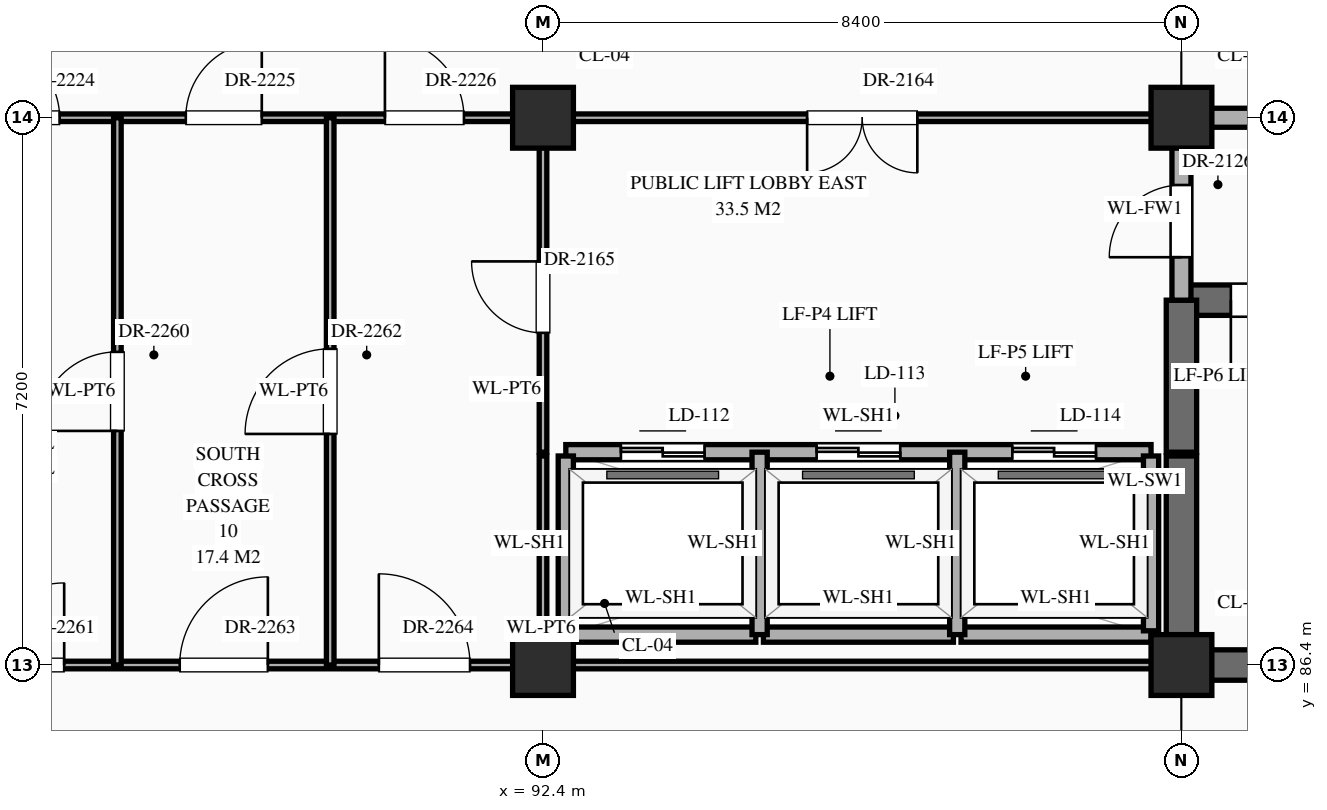
"""IFC4 building model, lengths in metres.
Left out: names, types, materials, properties, quantities, classifications, styles, units other than length and angle.
Written with IfcOpenShell. Run it as: python <this file> out.ifc"""

import sys

from ifc_helpers import new_model, si_unit, direction, frame, frame_2d, origin, origin_2d, place, context, subcontext, project, spatial, rectangle, extrude, element, fill, save


model = new_model("IFC4")
c1 = context("Model", 3, precision=1e-05, world=origin(), true_north=direction((0.0, 1.0)))
c2 = subcontext(c1, "Body", "Model", "MODEL_VIEW")
j1 = project(units=[si_unit("LENGTHUNIT", "METRE"), si_unit("PLANEANGLEUNIT", "RADIAN")], contexts=[c1])
p1 = place(None, origin())
s1 = spatial("IfcSite", under=j1, at=p1, CompositionType="ELEMENT")
p2 = place(p1, origin())
s2 = spatial("IfcBuilding", under=s1, at=p2, CompositionType="ELEMENT")
p3 = place(p2, frame((0.0, 0.0, 26.1)))
s3 = spatial("IfcBuildingStorey", under=s2, at=p3, CompositionType="ELEMENT", Elevation=26.1)
for number, where, z_axis, x_axis in (
    (1, (92.4, 86.4, 0.0), (0.0, 0.0, 1.0), (1.0, 0.0, 0.0)),
    (2, (92.4, 93.6, 0.0), (0.0, 0.0, 1.0), (1.0, 0.0, 0.0)),
    (3, (100.8, 86.4, 0.0), (0.0, 0.0, 1.0), (1.0, 0.0, 0.0)),
    (4, (100.8, 93.6, 0.0), (0.0, 0.0, 1.0), (1.0, 0.0, 0.0)),
):
    element("IfcColumn", number, at=place(p3, frame(where, z_axis=z_axis, x_axis=x_axis)), inside=s3, PredefinedType="COLUMN", context=c2, shape_type="SweptSolid", body=[
        extrude(rectangle(XDim=0.8, YDim=0.8, at=origin_2d()), origin(), (0.0, 0.0, 1.0), 4.5),
    ])
p4 = place(p3, frame((84.0, 86.4, 0.0), z_axis=(0.0, 0.0, 1.0), x_axis=(1.0, 0.0, 0.0)))
e5 = element("IfcWall", 5, at=p4, inside=s3, PredefinedType="STANDARD", context=c2, shape_type="SweptSolid", body=[
    extrude(rectangle(XDim=8.4, YDim=0.1, at=frame_2d((4.2, 0.0))), origin(), (0.0, 0.0, 1.0), 3.39),
])
p5 = place(p4, frame((1.02, 0.0, 0.0)))
e6 = element("IfcOpeningElement", 6, at=p5, cuts=e5, PredefinedType="OPENING", context=c2, shape_type="SweptSolid", body=[
    extrude(rectangle(XDim=1.08, YDim=2.25, at=frame_2d((0.54, 1.125))), frame((0.0, 0.062, 0.0), z_axis=(0.0, -1.0, 0.0), x_axis=(1.0, 0.0, 0.0)), (0.0, 0.0, 1.0), 0.124),
])
p6 = place(p4, frame((3.62, 0.0, 0.0)))
e7 = element("IfcOpeningElement", 7, at=p6, cuts=e5, PredefinedType="OPENING", context=c2, shape_type="SweptSolid", body=[
    extrude(rectangle(XDim=1.16, YDim=2.3, at=frame_2d((0.58, 1.15))), frame((0.0, 0.062, 0.0), z_axis=(0.0, -1.0, 0.0), x_axis=(1.0, 0.0, 0.0)), (0.0, 0.0, 1.0), 0.124),
])
p7 = place(p4, frame((6.24, 0.0, 0.0)))
e8 = element("IfcOpeningElement", 8, at=p7, cuts=e5, PredefinedType="OPENING", context=c2, shape_type="SweptSolid", body=[
    extrude(rectangle(XDim=1.2, YDim=2.35, at=frame_2d((0.6, 1.175))), frame((0.0, 0.062, 0.0), z_axis=(0.0, -1.0, 0.0), x_axis=(1.0, 0.0, 0.0)), (0.0, 0.0, 1.0), 0.124),
])
p8 = place(p3, frame((92.45, 86.4, 0.0), z_axis=(0.0, 0.0, 1.0), x_axis=(1.0, 0.0, 0.0)))
e9 = element("IfcWall", 9, at=p8, inside=s3, PredefinedType="STANDARD", context=c2, shape_type="SweptSolid", body=[
    extrude(rectangle(XDim=8.3, YDim=0.1, at=frame_2d((4.15, 0.0))), origin(), (0.0, 0.0, 1.0), 3.39),
])
p9 = place(p3, frame((100.8, 86.4, 0.0), z_axis=(0.0, 0.0, 1.0), x_axis=(1.0, 0.0, 0.0)))
e10 = element("IfcWall", 10, at=p9, inside=s3, PredefinedType="SHEAR", context=c2, shape_type="SweptSolid", body=[
    extrude(rectangle(XDim=8.4, YDim=0.4, at=frame_2d((4.2, 0.0))), origin(), (0.0, 0.0, 1.0), 4.24),
])
for number, where, z_axis, x_axis in (
    (11, (92.7, 86.8, 0.0), (0.0, 0.0, 1.0), (1.0, 0.0, 0.0)),
    (12, (95.3, 86.8, 0.0), (0.0, 0.0, 1.0), (1.0, 0.0, 0.0)),
    (13, (97.9, 86.8, 0.0), (0.0, 0.0, 1.0), (1.0, 0.0, 0.0)),
):
    element("IfcWall", number, at=place(p3, frame(where, z_axis=z_axis, x_axis=x_axis)), inside=s3, PredefinedType="STANDARD", context=c2, shape_type="SweptSolid", body=[
        extrude(rectangle(XDim=2.5, YDim=0.2, at=frame_2d((1.25, 0.0))), origin(), (0.0, 0.0, 1.0), 4.24),
    ])
p10 = place(p3, frame((92.7, 89.2, 0.0), z_axis=(0.0, 0.0, 1.0), x_axis=(1.0, 0.0, 0.0)))
e14 = element("IfcWall", 14, at=p10, inside=s3, PredefinedType="STANDARD", context=c2, shape_type="SweptSolid", body=[
    extrude(rectangle(XDim=7.7, YDim=0.2, at=frame_2d((3.85, 0.0))), origin(), (0.0, 0.0, 1.0), 4.24),
])
p11 = place(p10, frame((0.725, 0.0, 0.0)))
e15 = element("IfcOpeningElement", 15, at=p11, cuts=e14, PredefinedType="OPENING", context=c2, shape_type="SweptSolid", body=[
    extrude(rectangle(XDim=1.1, YDim=2.15, at=frame_2d((0.55, 1.075))), frame((0.0, 0.112, 0.0), z_axis=(0.0, -1.0, 0.0), x_axis=(1.0, 0.0, 0.0)), (0.0, 0.0, 1.0), 0.224),
])
p12 = place(p10, frame((3.3, 0.0, 0.0)))
e16 = element("IfcOpeningElement", 16, at=p12, cuts=e14, PredefinedType="OPENING", context=c2, shape_type="SweptSolid", body=[
    extrude(rectangle(XDim=1.1, YDim=2.15, at=frame_2d((0.55, 1.075))), frame((0.0, 0.112, 0.0), z_axis=(0.0, -1.0, 0.0), x_axis=(1.0, 0.0, 0.0)), (0.0, 0.0, 1.0), 0.224),
])
p13 = place(p10, frame((5.875, 0.0, 0.0)))
e17 = element("IfcOpeningElement", 17, at=p13, cuts=e14, PredefinedType="OPENING", context=c2, shape_type="SweptSolid", body=[
    extrude(rectangle(XDim=1.1, YDim=2.15, at=frame_2d((0.55, 1.075))), frame((0.0, 0.112, 0.0), z_axis=(0.0, -1.0, 0.0), x_axis=(1.0, 0.0, 0.0)), (0.0, 0.0, 1.0), 0.224),
])
p14 = place(p3, frame((100.8, 91.2, 0.0), z_axis=(0.0, 0.0, 1.0), x_axis=(1.0, 0.0, 0.0)))
e18 = element("IfcWall", 18, at=p14, inside=s3, PredefinedType="SHEAR", context=c2, shape_type="SweptSolid", body=[
    extrude(rectangle(XDim=8.4, YDim=0.4, at=frame_2d((4.2, 0.0))), origin(), (0.0, 0.0, 1.0), 4.24),
])
p15 = place(p14, frame((0.65, 0.0, 0.0)))
e19 = element("IfcOpeningElement", 19, at=p15, cuts=e18, PredefinedType="OPENING", context=c2, shape_type="SweptSolid", body=[
    extrude(rectangle(XDim=1.1, YDim=2.2, at=frame_2d((0.55, 1.1))), frame((0.0, 0.212, 0.0), z_axis=(0.0, -1.0, 0.0), x_axis=(1.0, 0.0, 0.0)), (0.0, 0.0, 1.0), 0.424),
])
p16 = place(p3, frame((67.2, 93.6, 0.0), z_axis=(0.0, 0.0, 1.0), x_axis=(1.0, 0.0, 0.0)))
e20 = element("IfcWall", 20, at=p16, inside=s3, PredefinedType="STANDARD", context=c2, shape_type="SweptSolid", body=[
    extrude(rectangle(XDim=33.6, YDim=0.1, at=frame_2d((16.8, 0.0))), origin(), (0.0, 0.0, 1.0), 3.39),
])
p17 = place(p16, frame((3.35, 0.0, 0.0)))
e21 = element("IfcOpeningElement", 21, at=p17, cuts=e20, PredefinedType="OPENING", context=c2, shape_type="SweptSolid", body=[
    extrude(rectangle(XDim=1.7, YDim=2.45, at=frame_2d((0.85, 1.225))), frame((0.0, 0.062, 0.0), z_axis=(0.0, -1.0, 0.0), x_axis=(1.0, 0.0, 0.0)), (0.0, 0.0, 1.0), 0.124),
])
p18 = place(p16, frame((28.675, 0.0, 0.0)))
e22 = element("IfcOpeningElement", 22, at=p18, cuts=e20, PredefinedType="OPENING", context=c2, shape_type="SweptSolid", body=[
    extrude(rectangle(XDim=1.45, YDim=2.3, at=frame_2d((0.725, 1.15))), frame((0.0, 0.062, 0.0), z_axis=(0.0, -1.0, 0.0), x_axis=(1.0, 0.0, 0.0)), (0.0, 0.0, 1.0), 0.124),
])
p19 = place(p16, frame((11.75, 0.0, 0.0)))
e23 = element("IfcOpeningElement", 23, at=p19, cuts=e20, PredefinedType="OPENING", context=c2, shape_type="SweptSolid", body=[
    extrude(rectangle(XDim=1.7, YDim=2.45, at=frame_2d((0.85, 1.225))), frame((0.0, 0.062, 0.0), z_axis=(0.0, -1.0, 0.0), x_axis=(1.0, 0.0, 0.0)), (0.0, 0.0, 1.0), 0.124),
])
p20 = place(p16, frame((17.88, 0.0, 0.0)))
e24 = element("IfcOpeningElement", 24, at=p20, cuts=e20, PredefinedType="OPENING", context=c2, shape_type="SweptSolid", body=[
    extrude(rectangle(XDim=0.96, YDim=2.2, at=frame_2d((0.48, 1.1))), frame((0.0, 0.062, 0.0), z_axis=(0.0, -1.0, 0.0), x_axis=(1.0, 0.0, 0.0)), (0.0, 0.0, 1.0), 0.124),
])
p21 = place(p16, frame((20.5, 0.0, 0.0)))
e25 = element("IfcOpeningElement", 25, at=p21, cuts=e20, PredefinedType="OPENING", context=c2, shape_type="SweptSolid", body=[
    extrude(rectangle(XDim=1.0, YDim=2.25, at=frame_2d((0.5, 1.125))), frame((0.0, 0.062, 0.0), z_axis=(0.0, -1.0, 0.0), x_axis=(1.0, 0.0, 0.0)), (0.0, 0.0, 1.0), 0.124),
])
p22 = place(p16, frame((23.12, 0.0, 0.0)))
e26 = element("IfcOpeningElement", 26, at=p22, cuts=e20, PredefinedType="OPENING", context=c2, shape_type="SweptSolid", body=[
    extrude(rectangle(XDim=1.04, YDim=2.2, at=frame_2d((0.52, 1.1))), frame((0.0, 0.062, 0.0), z_axis=(0.0, -1.0, 0.0), x_axis=(1.0, 0.0, 0.0)), (0.0, 0.0, 1.0), 0.124),
])
p23 = place(p3, frame((100.8, 93.6, 0.0), z_axis=(0.0, 0.0, 1.0), x_axis=(1.0, 0.0, 0.0)))
e27 = element("IfcWall", 27, at=p23, inside=s3, PredefinedType="STANDARD", context=c2, shape_type="SweptSolid", body=[
    extrude(rectangle(XDim=8.4, YDim=0.25, at=frame_2d((4.2, 0.0))), origin(), (0.0, 0.0, 1.0), 3.39),
])
p24 = place(p23, frame((3.3, 0.0, 0.0)))
e28 = element("IfcOpeningElement", 28, at=p24, cuts=e27, PredefinedType="OPENING", context=c2, shape_type="SweptSolid", body=[
    extrude(rectangle(XDim=1.8, YDim=2.35, at=frame_2d((0.9, 1.175))), frame((0.0, 0.137, 0.0), z_axis=(0.0, -1.0, 0.0), x_axis=(1.0, 0.0, 0.0)), (0.0, 0.0, 1.0), 0.274),
])
p25 = place(p3, frame((86.8, 86.4, 0.0), z_axis=(0.0, 0.0, 1.0), x_axis=(0.0, 1.0, 0.0)))
e29 = element("IfcWall", 29, at=p25, inside=s3, PredefinedType="STANDARD", context=c2, shape_type="SweptSolid", body=[
    extrude(rectangle(XDim=7.2, YDim=0.1, at=frame_2d((3.6, 0.0))), origin(), (0.0, 0.0, 1.0), 4.24),
])
p26 = place(p25, frame((3.08, 0.0, 0.0)))
e30 = element("IfcOpeningElement", 30, at=p26, cuts=e29, PredefinedType="OPENING", context=c2, shape_type="SweptSolid", body=[
    extrude(rectangle(XDim=1.04, YDim=2.2, at=frame_2d((0.52, 1.1))), frame((0.0, 0.062, 0.0), z_axis=(0.0, -1.0, 0.0), x_axis=(1.0, 0.0, 0.0)), (0.0, 0.0, 1.0), 0.124),
])
p27 = place(p3, frame((89.6, 86.4, 0.0), z_axis=(0.0, 0.0, 1.0), x_axis=(0.0, 1.0, 0.0)))
e31 = element("IfcWall", 31, at=p27, inside=s3, PredefinedType="STANDARD", context=c2, shape_type="SweptSolid", body=[
    extrude(rectangle(XDim=7.2, YDim=0.1, at=frame_2d((3.6, 0.0))), origin(), (0.0, 0.0, 1.0), 4.24),
])
p28 = place(p27, frame((3.04, 0.0, 0.0)))
e32 = element("IfcOpeningElement", 32, at=p28, cuts=e31, PredefinedType="OPENING", context=c2, shape_type="SweptSolid", body=[
    extrude(rectangle(XDim=1.12, YDim=2.25, at=frame_2d((0.56, 1.125))), frame((0.0, 0.062, 0.0), z_axis=(0.0, -1.0, 0.0), x_axis=(1.0, 0.0, 0.0)), (0.0, 0.0, 1.0), 0.124),
])
p29 = place(p3, frame((92.4, 86.45, 0.0), z_axis=(0.0, 0.0, 1.0), x_axis=(0.0, 1.0, 0.0)))
e33 = element("IfcWall", 33, at=p29, inside=s3, PredefinedType="STANDARD", context=c2, shape_type="SweptSolid", body=[
    extrude(rectangle(XDim=2.7, YDim=0.1, at=frame_2d((1.35, 0.0))), origin(), (0.0, 0.0, 1.0), 3.49),
])
p30 = place(p3, frame((92.4, 89.2, 0.0), z_axis=(0.0, 0.0, 1.0), x_axis=(0.0, 1.0, 0.0)))
e34 = element("IfcWall", 34, at=p30, inside=s3, PredefinedType="STANDARD", context=c2, shape_type="SweptSolid", body=[
    extrude(rectangle(XDim=4.4, YDim=0.1, at=frame_2d((2.2, 0.0))), origin(), (0.0, 0.0, 1.0), 3.49),
])
p31 = place(p30, frame((1.57, 0.0, 0.0)))
e35 = element("IfcOpeningElement", 35, at=p31, cuts=e34, PredefinedType="OPENING", context=c2, shape_type="SweptSolid", body=[
    extrude(rectangle(XDim=0.94, YDim=2.3, at=frame_2d((0.47, 1.15))), frame((0.0, 0.062, 0.0), z_axis=(0.0, -1.0, 0.0), x_axis=(1.0, 0.0, 0.0)), (0.0, 0.0, 1.0), 0.124),
])
p32 = place(p3, frame((92.7, 86.85, 0.0), z_axis=(0.0, 0.0, 1.0), x_axis=(0.0, 1.0, 0.0)))
e36 = element("IfcWall", 36, at=p32, inside=s3, PredefinedType="STANDARD", context=c2, shape_type="SweptSolid", body=[
    extrude(rectangle(XDim=2.3, YDim=0.2, at=frame_2d((1.15, 0.0))), origin(), (0.0, 0.0, 1.0), 4.24),
])
for number, where, z_axis, x_axis in (
    (37, (95.25, 86.8, 0.0), (0.0, 0.0, 1.0), (0.0, 1.0, 0.0)),
    (38, (97.85, 86.8, 0.0), (0.0, 0.0, 1.0), (0.0, 1.0, 0.0)),
):
    element("IfcWall", number, at=place(p3, frame(where, z_axis=z_axis, x_axis=x_axis)), inside=s3, PredefinedType="STANDARD", context=c2, shape_type="SweptSolid", body=[
        extrude(rectangle(XDim=2.4, YDim=0.2, at=frame_2d((1.2, 0.0))), origin(), (0.0, 0.0, 1.0), 4.24),
    ])
p33 = place(p3, frame((100.4, 86.85, 0.0), z_axis=(0.0, 0.0, 1.0), x_axis=(0.0, 1.0, 0.0)))
e39 = element("IfcWall", 39, at=p33, inside=s3, PredefinedType="STANDARD", context=c2, shape_type="SweptSolid", body=[
    extrude(rectangle(XDim=2.3, YDim=0.2, at=frame_2d((1.15, 0.0))), origin(), (0.0, 0.0, 1.0), 4.24),
])
p34 = place(p3, frame((100.8, 86.45, 0.0), z_axis=(0.0, 0.0, 1.0), x_axis=(0.0, 1.0, 0.0)))
e40 = element("IfcWall", 40, at=p34, inside=s3, PredefinedType="SHEAR", context=c2, shape_type="SweptSolid", body=[
    extrude(rectangle(XDim=2.7, YDim=0.4, at=frame_2d((1.35, 0.0))), origin(), (0.0, 0.0, 1.0), 4.24),
])
p35 = place(p3, frame((100.8, 89.2, 0.0), z_axis=(0.0, 0.0, 1.0), x_axis=(0.0, 1.0, 0.0)))
e41 = element("IfcWall", 41, at=p35, inside=s3, PredefinedType="SHEAR", context=c2, shape_type="SweptSolid", body=[
    extrude(rectangle(XDim=2.0, YDim=0.4, at=frame_2d((1.0, 0.0))), origin(), (0.0, 0.0, 1.0), 4.24),
])
p36 = place(p3, frame((100.8, 91.2, 0.0), z_axis=(0.0, 0.0, 1.0), x_axis=(0.0, 1.0, 0.0)))
e42 = element("IfcWall", 42, at=p36, inside=s3, PredefinedType="STANDARD", context=c2, shape_type="SweptSolid", body=[
    extrude(rectangle(XDim=2.4, YDim=0.25, at=frame_2d((1.2, 0.0))), origin(), (0.0, 0.0, 1.0), 3.49),
])
p37 = place(p36, frame((0.565, 0.0, 0.0)))
e43 = element("IfcOpeningElement", 43, at=p37, cuts=e42, PredefinedType="OPENING", context=c2, shape_type="SweptSolid", body=[
    extrude(rectangle(XDim=0.95, YDim=2.15, at=frame_2d((0.475, 1.075))), frame((0.0, 0.137, 0.0), z_axis=(0.0, -1.0, 0.0), x_axis=(1.0, 0.0, 0.0)), (0.0, 0.0, 1.0), 0.274),
])
p38 = place(p11, origin())
e44 = element("IfcDoor", 44, at=p38, inside=s3, OperationType="DOUBLE_DOOR_SLIDING", PredefinedType="DOOR", context=c2, shape_type="SweptSolid", body=[
    extrude(rectangle(XDim=1.1, YDim=2.15, at=frame_2d((0.55, 1.075))), frame((0.0, 0.025, 0.0), z_axis=(0.0, -1.0, 0.0), x_axis=(1.0, 0.0, 0.0)), (0.0, 0.0, 1.0), 0.05),
])
fill(e15, e44)
p39 = place(p12, origin())
e45 = element("IfcDoor", 45, at=p39, inside=s3, OperationType="DOUBLE_DOOR_SLIDING", PredefinedType="DOOR", context=c2, shape_type="SweptSolid", body=[
    extrude(rectangle(XDim=1.1, YDim=2.15, at=frame_2d((0.55, 1.075))), frame((0.0, 0.025, 0.0), z_axis=(0.0, -1.0, 0.0), x_axis=(1.0, 0.0, 0.0)), (0.0, 0.0, 1.0), 0.05),
])
fill(e16, e45)
p40 = place(p13, origin())
e46 = element("IfcDoor", 46, at=p40, inside=s3, OperationType="DOUBLE_DOOR_SLIDING", PredefinedType="DOOR", context=c2, shape_type="SweptSolid", body=[
    extrude(rectangle(XDim=1.1, YDim=2.15, at=frame_2d((0.55, 1.075))), frame((0.0, 0.025, 0.0), z_axis=(0.0, -1.0, 0.0), x_axis=(1.0, 0.0, 0.0)), (0.0, 0.0, 1.0), 0.05),
])
fill(e17, e46)
p41 = place(p15, frame((1.1, 0.0, 0.0), z_axis=(0.0, 0.0, 1.0), x_axis=(-1.0, 0.0, 0.0)))
e47 = element("IfcDoor", 47, at=p41, inside=s3, OperationType="SINGLE_SWING_RIGHT", PredefinedType="DOOR", context=c2, shape_type="SweptSolid", body=[
    extrude(rectangle(XDim=1.1, YDim=2.2, at=frame_2d((0.55, 1.1))), frame((0.0, 0.025, 0.0), z_axis=(0.0, -1.0, 0.0), x_axis=(1.0, 0.0, 0.0)), (0.0, 0.0, 1.0), 0.05),
])
fill(e19, e47)
p42 = place(p37, origin())
e48 = element("IfcDoor", 48, at=p42, inside=s3, OperationType="SINGLE_SWING_LEFT", PredefinedType="DOOR", context=c2, shape_type="SweptSolid", body=[
    extrude(rectangle(XDim=0.95, YDim=2.15, at=frame_2d((0.475, 1.075))), frame((0.0, 0.025, 0.0), z_axis=(0.0, -1.0, 0.0), x_axis=(1.0, 0.0, 0.0)), (0.0, 0.0, 1.0), 0.05),
])
fill(e43, e48)
p43 = place(p18, frame((1.45, 0.0, 0.0), z_axis=(0.0, 0.0, 1.0), x_axis=(-1.0, 0.0, 0.0)))
e49 = element("IfcDoor", 49, at=p43, inside=s3, OperationType="DOUBLE_DOOR_SINGLE_SWING", PredefinedType="DOOR", context=c2, shape_type="SweptSolid", body=[
    extrude(rectangle(XDim=1.45, YDim=2.3, at=frame_2d((0.725, 1.15))), frame((0.0, 0.025, 0.0), z_axis=(0.0, -1.0, 0.0), x_axis=(1.0, 0.0, 0.0)), (0.0, 0.0, 1.0), 0.05),
])
fill(e22, e49)
p44 = place(p31, origin())
e50 = element("IfcDoor", 50, at=p44, inside=s3, OperationType="SINGLE_SWING_RIGHT", PredefinedType="DOOR", context=c2, shape_type="SweptSolid", body=[
    extrude(rectangle(XDim=0.94, YDim=2.3, at=frame_2d((0.47, 1.15))), frame((0.0, 0.025, 0.0), z_axis=(0.0, -1.0, 0.0), x_axis=(1.0, 0.0, 0.0)), (0.0, 0.0, 1.0), 0.05),
])
fill(e35, e50)
p45 = place(p20, origin())
e51 = element("IfcDoor", 51, at=p45, inside=s3, OperationType="SINGLE_SWING_LEFT", PredefinedType="DOOR", context=c2, shape_type="SweptSolid", body=[
    extrude(rectangle(XDim=0.96, YDim=2.2, at=frame_2d((0.48, 1.1))), frame((0.0, 0.025, 0.0), z_axis=(0.0, -1.0, 0.0), x_axis=(1.0, 0.0, 0.0)), (0.0, 0.0, 1.0), 0.05),
])
fill(e24, e51)
p46 = place(p21, origin())
e52 = element("IfcDoor", 52, at=p46, inside=s3, OperationType="SINGLE_SWING_RIGHT", PredefinedType="DOOR", context=c2, shape_type="SweptSolid", body=[
    extrude(rectangle(XDim=1.0, YDim=2.25, at=frame_2d((0.5, 1.125))), frame((0.0, 0.025, 0.0), z_axis=(0.0, -1.0, 0.0), x_axis=(1.0, 0.0, 0.0)), (0.0, 0.0, 1.0), 0.05),
])
fill(e25, e52)
p47 = place(p22, origin())
e53 = element("IfcDoor", 53, at=p47, inside=s3, OperationType="SINGLE_SWING_LEFT", PredefinedType="DOOR", context=c2, shape_type="SweptSolid", body=[
    extrude(rectangle(XDim=1.04, YDim=2.2, at=frame_2d((0.52, 1.1))), frame((0.0, 0.025, 0.0), z_axis=(0.0, -1.0, 0.0), x_axis=(1.0, 0.0, 0.0)), (0.0, 0.0, 1.0), 0.05),
])
fill(e26, e53)
p48 = place(p26, origin())
e54 = element("IfcDoor", 54, at=p48, inside=s3, OperationType="SINGLE_SWING_LEFT", PredefinedType="DOOR", context=c2, shape_type="SweptSolid", body=[
    extrude(rectangle(XDim=1.04, YDim=2.2, at=frame_2d((0.52, 1.1))), frame((0.0, 0.025, 0.0), z_axis=(0.0, -1.0, 0.0), x_axis=(1.0, 0.0, 0.0)), (0.0, 0.0, 1.0), 0.05),
])
fill(e30, e54)
p49 = place(p5, origin())
e55 = element("IfcDoor", 55, at=p49, inside=s3, OperationType="SINGLE_SWING_RIGHT", PredefinedType="DOOR", context=c2, shape_type="SweptSolid", body=[
    extrude(rectangle(XDim=1.08, YDim=2.25, at=frame_2d((0.54, 1.125))), frame((0.0, 0.025, 0.0), z_axis=(0.0, -1.0, 0.0), x_axis=(1.0, 0.0, 0.0)), (0.0, 0.0, 1.0), 0.05),
])
fill(e6, e55)
p50 = place(p28, origin())
e56 = element("IfcDoor", 56, at=p50, inside=s3, OperationType="SINGLE_SWING_LEFT", PredefinedType="DOOR", context=c2, shape_type="SweptSolid", body=[
    extrude(rectangle(XDim=1.12, YDim=2.25, at=frame_2d((0.56, 1.125))), frame((0.0, 0.025, 0.0), z_axis=(0.0, -1.0, 0.0), x_axis=(1.0, 0.0, 0.0)), (0.0, 0.0, 1.0), 0.05),
])
fill(e32, e56)
p51 = place(p6, origin())
e57 = element("IfcDoor", 57, at=p51, inside=s3, OperationType="SINGLE_SWING_RIGHT", PredefinedType="DOOR", context=c2, shape_type="SweptSolid", body=[
    extrude(rectangle(XDim=1.16, YDim=2.3, at=frame_2d((0.58, 1.15))), frame((0.0, 0.025, 0.0), z_axis=(0.0, -1.0, 0.0), x_axis=(1.0, 0.0, 0.0)), (0.0, 0.0, 1.0), 0.05),
])
fill(e7, e57)
p52 = place(p7, origin())
e58 = element("IfcDoor", 58, at=p52, inside=s3, OperationType="SINGLE_SWING_LEFT", PredefinedType="DOOR", context=c2, shape_type="SweptSolid", body=[
    extrude(rectangle(XDim=1.2, YDim=2.35, at=frame_2d((0.6, 1.175))), frame((0.0, 0.025, 0.0), z_axis=(0.0, -1.0, 0.0), x_axis=(1.0, 0.0, 0.0)), (0.0, 0.0, 1.0), 0.05),
])
fill(e8, e58)
save(model, sys.argv[1])
